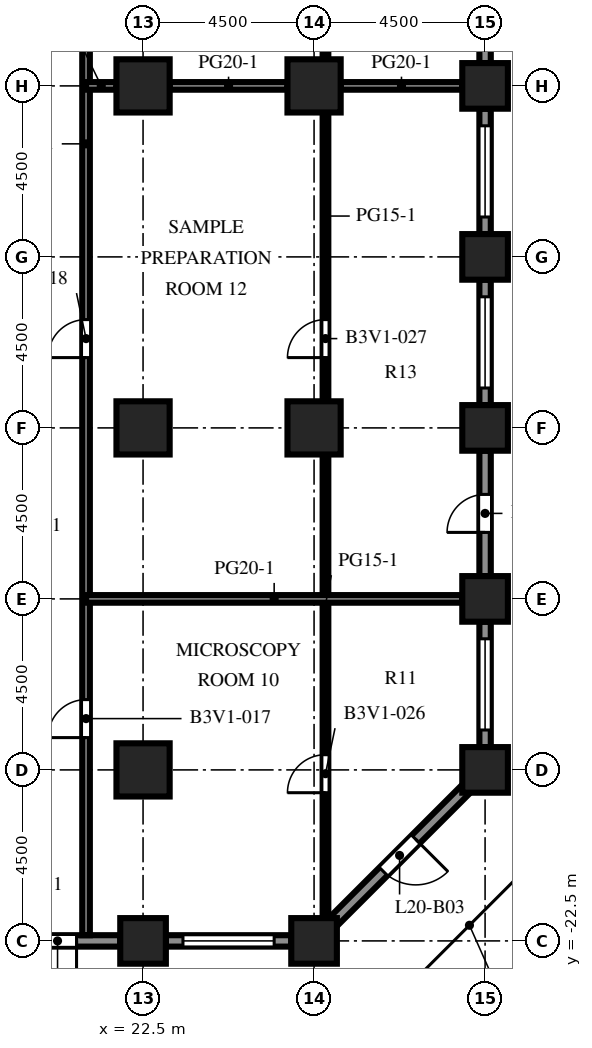
"""IFC4 building model, lengths in metres.
Left out: names, types, materials, properties, quantities, classifications, styles, units other than length and angle.
Written with IfcOpenShell. Run it as: python <this file> out.ifc"""

import sys

from ifc_helpers import new_model, si_unit, direction, frame, frame_2d, origin, origin_2d, place, context, subcontext, project, spatial, rectangle, extrude, element, fill, save


model = new_model("IFC4")
c1 = context("Model", 3, precision=1e-05, world=origin(), true_north=direction((0.0, 1.0)))
c2 = subcontext(c1, "Body", "Model", "MODEL_VIEW")
j1 = project(units=[si_unit("LENGTHUNIT", "METRE"), si_unit("PLANEANGLEUNIT", "RADIAN")], contexts=[c1])
p1 = place(None, origin())
s1 = spatial("IfcSite", under=j1, at=p1, CompositionType="ELEMENT")
p2 = place(p1, origin())
s2 = spatial("IfcBuilding", under=s1, at=p2, CompositionType="ELEMENT")
p3 = place(p2, frame((0.0, 0.0, 90.2)))
s3 = spatial("IfcBuildingStorey", under=s2, at=p3, CompositionType="ELEMENT", Elevation=90.2)
for number, where, z_axis, x_axis in (
    (1, (22.5, -22.5, 0.0), (0.0, 0.0, 1.0), (1.0, 0.0, 0.0)),
    (2, (27.0, -22.5, 0.0), (0.0, 0.0, 1.0), (1.0, 0.0, 0.0)),
    (3, (31.5, -18.0, 0.0), (0.0, 0.0, 1.0), (1.0, 0.0, 0.0)),
    (4, (31.5, -13.5, 0.0), (0.0, 0.0, 1.0), (1.0, 0.0, 0.0)),
    (5, (31.5, -9.0, 0.0), (0.0, 0.0, 1.0), (1.0, 0.0, 0.0)),
    (6, (31.5, -4.5, 0.0), (0.0, 0.0, 1.0), (1.0, 0.0, 0.0)),
    (7, (31.5, 0.0, 0.0), (0.0, 0.0, 1.0), (1.0, 0.0, 0.0)),
):
    element("IfcColumn", number, at=place(p3, frame(where, z_axis=z_axis, x_axis=x_axis)), inside=s3, PredefinedType="COLUMN", context=c2, shape_type="SweptSolid", body=[
        extrude(rectangle(XDim=1.2, YDim=1.2, at=origin_2d()), origin(), (0.0, 0.0, 1.0), 4.1),
    ])
for number, where, z_axis, x_axis in (
    (8, (22.5, -18.0, 0.0), (0.0, 0.0, 1.0), (1.0, 0.0, 0.0)),
    (9, (22.5, -9.0, 0.0), (0.0, 0.0, 1.0), (1.0, 0.0, 0.0)),
    (10, (22.5, 0.0, 0.0), (0.0, 0.0, 1.0), (1.0, 0.0, 0.0)),
    (11, (27.0, -9.0, 0.0), (0.0, 0.0, 1.0), (1.0, 0.0, 0.0)),
    (12, (27.0, 0.0, 0.0), (0.0, 0.0, 1.0), (1.0, 0.0, 0.0)),
):
    element("IfcColumn", number, at=place(p3, frame(where, z_axis=z_axis, x_axis=x_axis)), inside=s3, PredefinedType="COLUMN", context=c2, shape_type="SweptSolid", body=[
        extrude(rectangle(XDim=1.4, YDim=1.4, at=origin_2d()), origin(), (0.0, 0.0, 1.0), 4.1),
    ])
p4 = place(p3, frame((21.9, -22.5, 0.0), z_axis=(0.0, 0.0, 1.0), x_axis=(-1.0, 0.0, 0.0)))
e13 = element("IfcWall", 13, at=p4, inside=s3, PredefinedType="SOLIDWALL", context=c2, shape_type="SweptSolid", body=[
    extrude(rectangle(XDim=3.3, YDim=0.3, at=frame_2d((1.65, 0.0))), origin(), (0.0, 0.0, 1.0), 2.75),
])
p5 = place(p4, frame((1.15, 0.0, 0.0)))
e14 = element("IfcOpeningElement", 14, at=p5, cuts=e13, PredefinedType="OPENING", context=c2, shape_type="SweptSolid", body=[
    extrude(rectangle(XDim=1.0, YDim=2.2, at=frame_2d((0.5, 1.1))), frame((0.0, 0.16, 0.0), z_axis=(0.0, -1.0, 0.0), x_axis=(1.0, 0.0, 0.0)), (0.0, 0.0, 1.0), 0.32),
])
p6 = place(p3, frame((26.4, -22.5, 0.0), z_axis=(0.0, 0.0, 1.0), x_axis=(-1.0, 0.0, 0.0)))
e15 = element("IfcWall", 15, at=p6, inside=s3, PredefinedType="SOLIDWALL", context=c2, shape_type="SweptSolid", body=[
    extrude(rectangle(XDim=3.3, YDim=0.3, at=frame_2d((1.65, 0.0))), origin(), (0.0, 0.0, 1.0), 2.75),
])
p7 = place(p6, frame((0.45, 0.0, 0.8)))
e16 = element("IfcOpeningElement", 16, at=p7, cuts=e15, PredefinedType="OPENING", context=c2, shape_type="SweptSolid", body=[
    extrude(rectangle(XDim=2.4, YDim=1.7, at=frame_2d((1.2, 0.85))), frame((0.0, 0.16, 0.0), z_axis=(0.0, -1.0, 0.0), x_axis=(1.0, 0.0, 0.0)), (0.0, 0.0, 1.0), 0.32),
])
p8 = place(p3, frame((31.006, -18.494, 0.0), z_axis=(0.0, 0.0, 1.0), x_axis=(-0.707106781187, -0.707106781187, 0.0)))
e17 = element("IfcWall", 17, at=p8, inside=s3, PredefinedType="SOLIDWALL", context=c2, shape_type="SweptSolid", body=[
    extrude(rectangle(XDim=4.967, YDim=0.3, at=frame_2d((2.483, 0.0))), origin(), (0.0, 0.0, 1.0), 2.75),
])
p9 = place(p8, frame((1.884, 0.0, 0.0)))
e18 = element("IfcOpeningElement", 18, at=p9, cuts=e17, PredefinedType="OPENING", context=c2, shape_type="SweptSolid", body=[
    extrude(rectangle(XDim=1.2, YDim=2.2, at=frame_2d((0.6, 1.1))), frame((0.0, 0.16, 0.0), z_axis=(0.0, -1.0, 0.0), x_axis=(1.0, 0.0, 0.0)), (0.0, 0.0, 1.0), 0.32),
])
p10 = place(p3, frame((31.5, -14.1, 0.0), z_axis=(0.0, 0.0, 1.0), x_axis=(0.0, -1.0, 0.0)))
e19 = element("IfcWall", 19, at=p10, inside=s3, PredefinedType="SOLIDWALL", context=c2, shape_type="SweptSolid", body=[
    extrude(rectangle(XDim=3.3, YDim=0.3, at=frame_2d((1.65, 0.0))), origin(), (0.0, 0.0, 1.0), 2.75),
])
p11 = place(p10, frame((0.45, 0.0, 0.8)))
e20 = element("IfcOpeningElement", 20, at=p11, cuts=e19, PredefinedType="OPENING", context=c2, shape_type="SweptSolid", body=[
    extrude(rectangle(XDim=2.4, YDim=1.7, at=frame_2d((1.2, 0.85))), frame((0.0, 0.16, 0.0), z_axis=(0.0, -1.0, 0.0), x_axis=(1.0, 0.0, 0.0)), (0.0, 0.0, 1.0), 0.32),
])
p12 = place(p3, frame((31.5, -9.6, 0.0), z_axis=(0.0, 0.0, 1.0), x_axis=(0.0, -1.0, 0.0)))
e21 = element("IfcWall", 21, at=p12, inside=s3, PredefinedType="SOLIDWALL", context=c2, shape_type="SweptSolid", body=[
    extrude(rectangle(XDim=3.3, YDim=0.3, at=frame_2d((1.65, 0.0))), origin(), (0.0, 0.0, 1.0), 2.75),
])
p13 = place(p12, frame((1.15, 0.0, 0.0)))
e22 = element("IfcOpeningElement", 22, at=p13, cuts=e21, PredefinedType="OPENING", context=c2, shape_type="SweptSolid", body=[
    extrude(rectangle(XDim=1.0, YDim=2.2, at=frame_2d((0.5, 1.1))), frame((0.0, 0.16, 0.0), z_axis=(0.0, -1.0, 0.0), x_axis=(1.0, 0.0, 0.0)), (0.0, 0.0, 1.0), 0.32),
])
p14 = place(p3, frame((31.5, -5.1, 0.0), z_axis=(0.0, 0.0, 1.0), x_axis=(0.0, -1.0, 0.0)))
e23 = element("IfcWall", 23, at=p14, inside=s3, PredefinedType="SOLIDWALL", context=c2, shape_type="SweptSolid", body=[
    extrude(rectangle(XDim=3.3, YDim=0.3, at=frame_2d((1.65, 0.0))), origin(), (0.0, 0.0, 1.0), 2.75),
])
p15 = place(p14, frame((0.45, 0.0, 0.8)))
e24 = element("IfcOpeningElement", 24, at=p15, cuts=e23, PredefinedType="OPENING", context=c2, shape_type="SweptSolid", body=[
    extrude(rectangle(XDim=2.4, YDim=1.7, at=frame_2d((1.2, 0.85))), frame((0.0, 0.16, 0.0), z_axis=(0.0, -1.0, 0.0), x_axis=(1.0, 0.0, 0.0)), (0.0, 0.0, 1.0), 0.32),
])
p16 = place(p3, frame((31.5, -0.6, 0.0), z_axis=(0.0, 0.0, 1.0), x_axis=(0.0, -1.0, 0.0)))
e25 = element("IfcWall", 25, at=p16, inside=s3, PredefinedType="SOLIDWALL", context=c2, shape_type="SweptSolid", body=[
    extrude(rectangle(XDim=3.3, YDim=0.3, at=frame_2d((1.65, 0.0))), origin(), (0.0, 0.0, 1.0), 2.75),
])
p17 = place(p16, frame((0.45, 0.0, 0.8)))
e26 = element("IfcOpeningElement", 26, at=p17, cuts=e25, PredefinedType="OPENING", context=c2, shape_type="SweptSolid", body=[
    extrude(rectangle(XDim=2.4, YDim=1.7, at=frame_2d((1.2, 0.85))), frame((0.0, 0.16, 0.0), z_axis=(0.0, -1.0, 0.0), x_axis=(1.0, 0.0, 0.0)), (0.0, 0.0, 1.0), 0.32),
])
p18 = place(p3, frame((31.5, 3.9, 0.0), z_axis=(0.0, 0.0, 1.0), x_axis=(0.0, -1.0, 0.0)))
e27 = element("IfcWall", 27, at=p18, inside=s3, PredefinedType="SOLIDWALL", context=c2, shape_type="SweptSolid", body=[
    extrude(rectangle(XDim=3.3, YDim=0.3, at=frame_2d((1.65, 0.0))), origin(), (0.0, 0.0, 1.0), 2.75),
])
p19 = place(p18, frame((0.45, 0.0, 0.8)))
e28 = element("IfcOpeningElement", 28, at=p19, cuts=e27, PredefinedType="OPENING", context=c2, shape_type="SweptSolid", body=[
    extrude(rectangle(XDim=2.4, YDim=1.7, at=frame_2d((1.2, 0.85))), frame((0.0, 0.16, 0.0), z_axis=(0.0, -1.0, 0.0), x_axis=(1.0, 0.0, 0.0)), (0.0, 0.0, 1.0), 0.32),
])
p20 = place(p3, frame((21.0, 31.35, 0.0), z_axis=(0.0, 0.0, 1.0), x_axis=(0.0, -1.0, 0.0)))
e29 = element("IfcWall", 29, at=p20, inside=s3, PredefinedType="PARTITIONING", context=c2, shape_type="SweptSolid", body=[
    extrude(rectangle(XDim=53.7, YDim=0.2, at=frame_2d((26.85, 0.0))), origin(), (0.0, 0.0, 1.0), 3.65),
])
p21 = place(p20, frame((47.5, 0.0, 0.0)))
e30 = element("IfcOpeningElement", 30, at=p21, cuts=e29, PredefinedType="OPENING", context=c2, shape_type="SweptSolid", body=[
    extrude(rectangle(XDim=1.0, YDim=2.1, at=frame_2d((0.5, 1.05))), frame((0.0, 0.11, 0.0), z_axis=(0.0, -1.0, 0.0), x_axis=(1.0, 0.0, 0.0)), (0.0, 0.0, 1.0), 0.22),
])
p22 = place(p20, frame((37.5, 0.0, 0.0)))
e31 = element("IfcOpeningElement", 31, at=p22, cuts=e29, PredefinedType="OPENING", context=c2, shape_type="SweptSolid", body=[
    extrude(rectangle(XDim=1.0, YDim=2.1, at=frame_2d((0.5, 1.05))), frame((0.0, 0.11, 0.0), z_axis=(0.0, -1.0, 0.0), x_axis=(1.0, 0.0, 0.0)), (0.0, 0.0, 1.0), 0.22),
])
p23 = place(p20, frame((27.25, 0.0, 0.0)))
e32 = element("IfcOpeningElement", 32, at=p23, cuts=e29, PredefinedType="OPENING", context=c2, shape_type="SweptSolid", body=[
    extrude(rectangle(XDim=1.0, YDim=2.1, at=frame_2d((0.5, 1.05))), frame((0.0, 0.11, 0.0), z_axis=(0.0, -1.0, 0.0), x_axis=(1.0, 0.0, 0.0)), (0.0, 0.0, 1.0), 0.22),
])
p24 = place(p20, frame((17.5, 0.0, 0.0)))
e33 = element("IfcOpeningElement", 33, at=p24, cuts=e29, PredefinedType="OPENING", context=c2, shape_type="SweptSolid", body=[
    extrude(rectangle(XDim=1.0, YDim=2.1, at=frame_2d((0.5, 1.05))), frame((0.0, 0.11, 0.0), z_axis=(0.0, -1.0, 0.0), x_axis=(1.0, 0.0, 0.0)), (0.0, 0.0, 1.0), 0.22),
])
p25 = place(p20, frame((10.75, 0.0, 0.0)))
e34 = element("IfcOpeningElement", 34, at=p25, cuts=e29, PredefinedType="OPENING", context=c2, shape_type="SweptSolid", body=[
    extrude(rectangle(XDim=1.0, YDim=2.1, at=frame_2d((0.5, 1.05))), frame((0.0, 0.11, 0.0), z_axis=(0.0, -1.0, 0.0), x_axis=(1.0, 0.0, 0.0)), (0.0, 0.0, 1.0), 0.22),
])
p26 = place(p20, frame((5.25, 0.0, 0.0)))
e35 = element("IfcOpeningElement", 35, at=p26, cuts=e29, PredefinedType="OPENING", context=c2, shape_type="SweptSolid", body=[
    extrude(rectangle(XDim=1.0, YDim=2.1, at=frame_2d((0.5, 1.05))), frame((0.0, 0.11, 0.0), z_axis=(0.0, -1.0, 0.0), x_axis=(1.0, 0.0, 0.0)), (0.0, 0.0, 1.0), 0.22),
])
p27 = place(p3, frame((27.3, -9.7, 0.0), z_axis=(0.0, 0.0, 1.0), x_axis=(0.0, -1.0, 0.0)))
e36 = element("IfcWall", 36, at=p27, inside=s3, PredefinedType="PARTITIONING", context=c2, shape_type="SweptSolid", body=[
    extrude(rectangle(XDim=12.077, YDim=0.15, at=frame_2d((6.039, 0.0))), origin(), (0.0, 0.0, 1.0), 3.65),
])
p28 = place(p27, frame((7.9, 0.0, 0.0)))
e37 = element("IfcOpeningElement", 37, at=p28, cuts=e36, PredefinedType="OPENING", context=c2, shape_type="SweptSolid", body=[
    extrude(rectangle(XDim=1.0, YDim=2.1, at=frame_2d((0.5, 1.05))), frame((0.0, 0.085, 0.0), z_axis=(0.0, -1.0, 0.0), x_axis=(1.0, 0.0, 0.0)), (0.0, 0.0, 1.0), 0.17),
])
p29 = place(p3, frame((27.3, -0.7, 0.0), z_axis=(0.0, 0.0, 1.0), x_axis=(0.0, -1.0, 0.0)))
e38 = element("IfcWall", 38, at=p29, inside=s3, PredefinedType="PARTITIONING", context=c2, shape_type="SweptSolid", body=[
    extrude(rectangle(XDim=7.6, YDim=0.15, at=frame_2d((3.8, 0.0))), origin(), (0.0, 0.0, 1.0), 3.65),
])
p30 = place(p29, frame((5.45, 0.0, 0.0)))
e39 = element("IfcOpeningElement", 39, at=p30, cuts=e38, PredefinedType="OPENING", context=c2, shape_type="SweptSolid", body=[
    extrude(rectangle(XDim=1.0, YDim=2.1, at=frame_2d((0.5, 1.05))), frame((0.0, 0.085, 0.0), z_axis=(0.0, -1.0, 0.0), x_axis=(1.0, 0.0, 0.0)), (0.0, 0.0, 1.0), 0.17),
])
p31 = place(p3, frame((27.3, 8.3, 0.0), z_axis=(0.0, 0.0, 1.0), x_axis=(0.0, -1.0, 0.0)))
e40 = element("IfcWall", 40, at=p31, inside=s3, PredefinedType="PARTITIONING", context=c2, shape_type="SweptSolid", body=[
    extrude(rectangle(XDim=7.6, YDim=0.15, at=frame_2d((3.8, 0.0))), origin(), (0.0, 0.0, 1.0), 3.65),
])
p32 = place(p31, frame((2.7, 0.0, 0.0)))
e41 = element("IfcOpeningElement", 41, at=p32, cuts=e40, PredefinedType="OPENING", context=c2, shape_type="SweptSolid", body=[
    extrude(rectangle(XDim=1.0, YDim=2.1, at=frame_2d((0.5, 1.05))), frame((0.0, 0.085, 0.0), z_axis=(0.0, -1.0, 0.0), x_axis=(1.0, 0.0, 0.0)), (0.0, 0.0, 1.0), 0.17),
])
p33 = place(p3, frame((21.0, -13.5, 0.0), z_axis=(0.0, 0.0, 1.0), x_axis=(1.0, 0.0, 0.0)))
e42 = element("IfcWall", 42, at=p33, inside=s3, PredefinedType="PARTITIONING", context=c2, shape_type="SweptSolid", body=[
    extrude(rectangle(XDim=9.9, YDim=0.2, at=frame_2d((4.95, 0.0))), origin(), (0.0, 0.0, 1.0), 3.65),
])
p34 = place(p3, frame((21.0, 0.0, 0.0), z_axis=(0.0, 0.0, 1.0), x_axis=(1.0, 0.0, 0.0)))
e43 = element("IfcWall", 43, at=p34, inside=s3, PredefinedType="PARTITIONING", context=c2, shape_type="SweptSolid", body=[
    extrude(rectangle(XDim=0.8, YDim=0.2, at=frame_2d((0.4, 0.0))), origin(), (0.0, 0.0, 1.0), 3.65),
])
p35 = place(p3, frame((23.2, 0.0, 0.0), z_axis=(0.0, 0.0, 1.0), x_axis=(1.0, 0.0, 0.0)))
e44 = element("IfcWall", 44, at=p35, inside=s3, PredefinedType="PARTITIONING", context=c2, shape_type="SweptSolid", body=[
    extrude(rectangle(XDim=3.1, YDim=0.2, at=frame_2d((1.55, 0.0))), origin(), (0.0, 0.0, 1.0), 3.65),
])
p36 = place(p3, frame((27.7, 0.0, 0.0), z_axis=(0.0, 0.0, 1.0), x_axis=(1.0, 0.0, 0.0)))
e45 = element("IfcWall", 45, at=p36, inside=s3, PredefinedType="PARTITIONING", context=c2, shape_type="SweptSolid", body=[
    extrude(rectangle(XDim=3.2, YDim=0.2, at=frame_2d((1.6, 0.0))), origin(), (0.0, 0.0, 1.0), 3.65),
])
p37 = place(p5, origin())
e46 = element("IfcDoor", 46, at=p37, inside=s3, OperationType="SINGLE_SWING_LEFT", PredefinedType="DOOR", context=c2, shape_type="SweptSolid", body=[
    extrude(rectangle(XDim=1.0, YDim=2.2, at=frame_2d((0.5, 1.1))), frame((0.0, 0.025, 0.0), z_axis=(0.0, -1.0, 0.0), x_axis=(1.0, 0.0, 0.0)), (0.0, 0.0, 1.0), 0.05),
])
fill(e14, e46)
p38 = place(p7, origin())
e47 = element("IfcWindow", 47, at=p38, inside=s3, PartitioningType="SINGLE_PANEL", PredefinedType="WINDOW", context=c2, shape_type="SweptSolid", body=[
    extrude(rectangle(XDim=2.4, YDim=1.7, at=frame_2d((1.2, 0.85))), frame((0.0, 0.03, 0.0), z_axis=(0.0, -1.0, 0.0), x_axis=(1.0, 0.0, 0.0)), (0.0, 0.0, 1.0), 0.06),
])
fill(e16, e47)
p39 = place(p9, origin())
e48 = element("IfcDoor", 48, at=p39, inside=s3, OperationType="SINGLE_SWING_LEFT", PredefinedType="DOOR", context=c2, shape_type="SweptSolid", body=[
    extrude(rectangle(XDim=1.2, YDim=2.2, at=frame_2d((0.6, 1.1))), frame((0.0, 0.025, 0.0), z_axis=(0.0, -1.0, 0.0), x_axis=(1.0, 0.0, 0.0)), (0.0, 0.0, 1.0), 0.05),
])
fill(e18, e48)
p40 = place(p11, origin())
e49 = element("IfcWindow", 49, at=p40, inside=s3, PartitioningType="SINGLE_PANEL", PredefinedType="WINDOW", context=c2, shape_type="SweptSolid", body=[
    extrude(rectangle(XDim=2.4, YDim=1.7, at=frame_2d((1.2, 0.85))), frame((0.0, 0.03, 0.0), z_axis=(0.0, -1.0, 0.0), x_axis=(1.0, 0.0, 0.0)), (0.0, 0.0, 1.0), 0.06),
])
fill(e20, e49)
p41 = place(p13, origin())
e50 = element("IfcDoor", 50, at=p41, inside=s3, OperationType="SINGLE_SWING_RIGHT", PredefinedType="DOOR", context=c2, shape_type="SweptSolid", body=[
    extrude(rectangle(XDim=1.0, YDim=2.2, at=frame_2d((0.5, 1.1))), frame((0.0, 0.025, 0.0), z_axis=(0.0, -1.0, 0.0), x_axis=(1.0, 0.0, 0.0)), (0.0, 0.0, 1.0), 0.05),
])
fill(e22, e50)
p42 = place(p15, origin())
e51 = element("IfcWindow", 51, at=p42, inside=s3, PartitioningType="SINGLE_PANEL", PredefinedType="WINDOW", context=c2, shape_type="SweptSolid", body=[
    extrude(rectangle(XDim=2.4, YDim=1.7, at=frame_2d((1.2, 0.85))), frame((0.0, 0.03, 0.0), z_axis=(0.0, -1.0, 0.0), x_axis=(1.0, 0.0, 0.0)), (0.0, 0.0, 1.0), 0.06),
])
fill(e24, e51)
p43 = place(p17, origin())
e52 = element("IfcWindow", 52, at=p43, inside=s3, PartitioningType="SINGLE_PANEL", PredefinedType="WINDOW", context=c2, shape_type="SweptSolid", body=[
    extrude(rectangle(XDim=2.4, YDim=1.7, at=frame_2d((1.2, 0.85))), frame((0.0, 0.03, 0.0), z_axis=(0.0, -1.0, 0.0), x_axis=(1.0, 0.0, 0.0)), (0.0, 0.0, 1.0), 0.06),
])
fill(e26, e52)
p44 = place(p21, origin())
e53 = element("IfcDoor", 53, at=p44, inside=s3, OperationType="SINGLE_SWING_RIGHT", PredefinedType="DOOR", context=c2, shape_type="SweptSolid", body=[
    extrude(rectangle(XDim=1.0, YDim=2.1, at=frame_2d((0.5, 1.05))), frame((0.0, 0.025, 0.0), z_axis=(0.0, -1.0, 0.0), x_axis=(1.0, 0.0, 0.0)), (0.0, 0.0, 1.0), 0.05),
])
fill(e30, e53)
p45 = place(p22, origin())
e54 = element("IfcDoor", 54, at=p45, inside=s3, OperationType="SINGLE_SWING_RIGHT", PredefinedType="DOOR", context=c2, shape_type="SweptSolid", body=[
    extrude(rectangle(XDim=1.0, YDim=2.1, at=frame_2d((0.5, 1.05))), frame((0.0, 0.025, 0.0), z_axis=(0.0, -1.0, 0.0), x_axis=(1.0, 0.0, 0.0)), (0.0, 0.0, 1.0), 0.05),
])
fill(e31, e54)
p46 = place(p28, origin())
e55 = element("IfcDoor", 55, at=p46, inside=s3, OperationType="SINGLE_SWING_RIGHT", PredefinedType="DOOR", context=c2, shape_type="SweptSolid", body=[
    extrude(rectangle(XDim=1.0, YDim=2.1, at=frame_2d((0.5, 1.05))), frame((0.0, 0.025, 0.0), z_axis=(0.0, -1.0, 0.0), x_axis=(1.0, 0.0, 0.0)), (0.0, 0.0, 1.0), 0.05),
])
fill(e37, e55)
p47 = place(p30, origin())
e56 = element("IfcDoor", 56, at=p47, inside=s3, OperationType="SINGLE_SWING_RIGHT", PredefinedType="DOOR", context=c2, shape_type="SweptSolid", body=[
    extrude(rectangle(XDim=1.0, YDim=2.1, at=frame_2d((0.5, 1.05))), frame((0.0, 0.025, 0.0), z_axis=(0.0, -1.0, 0.0), x_axis=(1.0, 0.0, 0.0)), (0.0, 0.0, 1.0), 0.05),
])
fill(e39, e56)
save(model, sys.argv[1])
